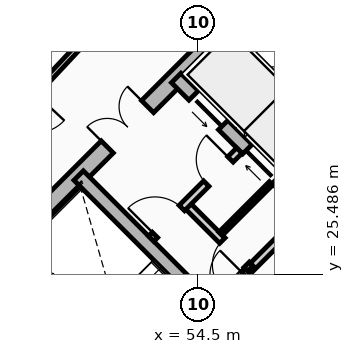
"""IFC4 building model, lengths in metres.
Left out: names, types, materials, properties, quantities, classifications, styles, units other than length and angle.
Written with IfcOpenShell. Run it as: python <this file> out.ifc"""

import sys

from ifc_helpers import new_model, si_unit, direction, frame, frame_2d, origin, place, context, subcontext, project, spatial, rectangle, extrude, source, transform, mapped, element, fill, save


model = new_model("IFC4")
c1 = context("Model", 3, precision=1e-05, world=origin(), true_north=direction((0.0, 1.0)))
c2 = subcontext(c1, "Body", "Model", "MODEL_VIEW")
j1 = project(units=[si_unit("LENGTHUNIT", "METRE"), si_unit("PLANEANGLEUNIT", "RADIAN")], contexts=[c1])
p1 = place(None, origin())
s1 = spatial("IfcSite", under=j1, at=p1, CompositionType="ELEMENT")
p2 = place(p1, origin())
s2 = spatial("IfcBuilding", under=s1, at=p2, CompositionType="ELEMENT")
p3 = place(p2, frame((0.0, 0.0, 73.06)))
s3 = spatial("IfcBuildingStorey", under=s2, at=p3, CompositionType="ELEMENT", Elevation=73.06)
for number, where, z_axis, x_axis in (
    (1, (58.737, 15.697, 0.0), (0.0, 0.0, 1.0), (-0.707, 0.707, 0.0)),
    (2, (66.303, 23.263, 0.0), (0.0, 0.0, 1.0), (-0.707, 0.707, 0.0)),
):
    element("IfcWall", number, at=place(p3, frame(where, z_axis=z_axis, x_axis=x_axis)), inside=s3, PredefinedType="SHEAR", context=c2, shape_type="SweptSolid", body=[
        extrude(rectangle(XDim=14.2, YDim=0.45, at=frame_2d((7.1, 0.0))), origin(), (0.0, 0.0, 1.0), 2.91),
    ])
p4 = place(p3, frame((48.856, 25.578, 0.0), z_axis=(0.0, 0.0, 1.0), x_axis=(0.707106781187, 0.707106781187, 0.0)))
e3 = element("IfcWall", 3, at=p4, inside=s3, PredefinedType="SHEAR", context=c2, shape_type="SweptSolid", body=[
    extrude(rectangle(XDim=10.7, YDim=0.45, at=frame_2d((5.35, 0.0))), origin(), (0.0, 0.0, 1.0), 2.91),
])
m1 = source(origin(), c2, "Body", "SweptSolid", [
    extrude(rectangle(XDim=1.5, YDim=2.02, at=frame_2d((0.75, 1.01))), frame((0.0, 0.235, 0.0), z_axis=(0.0, -1.0, 0.0), x_axis=(1.0, 0.0, 0.0)), (0.0, 0.0, 1.0), 0.47),
])
p5 = place(p4, frame((4.6, 0.0, 0.0)))
e4 = element("IfcOpeningElement", 4, at=p5, cuts=e3, PredefinedType="OPENING", context=c2, shape_type="MappedRepresentation", body=[
    mapped(m1, transform((0.0, 0.0, 0.0), x_axis=(1.0, 0.0, 0.0), y_axis=(0.0, 1.0, 0.0), z_axis=(0.0, 0.0, 1.0), scale=1.0)),
])
p6 = place(p3, frame((61.078, 18.355, 0.0), z_axis=(0.0, 0.0, 1.0), x_axis=(-0.707106781187, 0.707106781187, 0.0)))
e5 = element("IfcWall", 5, at=p6, inside=s3, PredefinedType="SHEAR", context=c2, shape_type="SweptSolid", body=[
    extrude(rectangle(XDim=13.75, YDim=0.35, at=frame_2d((6.875, 0.0))), origin(), (0.0, 0.0, 1.0), 2.91),
])
m2 = source(origin(), c2, "Body", "SweptSolid", [
    extrude(rectangle(XDim=1.1, YDim=2.015, at=frame_2d((0.55, 1.007))), frame((0.0, 0.185, 0.0), z_axis=(0.0, -1.0, 0.0), x_axis=(1.0, 0.0, 0.0)), (0.0, 0.0, 1.0), 0.37),
])
p7 = place(p6, frame((4.875, 0.0, 0.0)))
e6 = element("IfcOpeningElement", 6, at=p7, cuts=e5, PredefinedType="OPENING", context=c2, shape_type="MappedRepresentation", body=[
    mapped(m2, transform((0.0, 0.0, 0.0), x_axis=(1.0, 0.0, 0.0), y_axis=(0.0, 1.0, 0.0), z_axis=(0.0, 0.0, 1.0), scale=1.0)),
])
m3 = source(origin(), c2, "Body", "SweptSolid", [
    extrude(rectangle(XDim=1.15, YDim=2.02, at=frame_2d((0.575, 1.01))), frame((0.0, 0.185, 0.0), z_axis=(0.0, -1.0, 0.0), x_axis=(1.0, 0.0, 0.0)), (0.0, 0.0, 1.0), 0.37),
])
p8 = place(p6, frame((7.295, 0.0, 0.0)))
e7 = element("IfcOpeningElement", 7, at=p8, cuts=e5, PredefinedType="OPENING", context=c2, shape_type="MappedRepresentation", body=[
    mapped(m3, transform((0.0, 0.0, 0.0), x_axis=(1.0, 0.0, 0.0), y_axis=(0.0, 1.0, 0.0), z_axis=(0.0, 0.0, 1.0), scale=1.0)),
])
p9 = place(p3, frame((63.645, 20.922, 0.0), z_axis=(0.0, 0.0, 1.0), x_axis=(-0.707106781187, 0.707106781187, 0.0)))
e8 = element("IfcWall", 8, at=p9, inside=s3, PredefinedType="SHEAR", context=c2, shape_type="SweptSolid", body=[
    extrude(rectangle(XDim=13.75, YDim=0.35, at=frame_2d((6.875, 0.0))), origin(), (0.0, 0.0, 1.0), 2.91),
])
p10 = place(p9, frame((10.0, 0.0, 0.0)))
e9 = element("IfcOpeningElement", 9, at=p10, cuts=e8, PredefinedType="OPENING", context=c2, shape_type="MappedRepresentation", body=[
    mapped(m2, transform((0.0, 0.0, 0.0), x_axis=(1.0, 0.0, 0.0), y_axis=(0.0, 1.0, 0.0), z_axis=(0.0, 0.0, 1.0), scale=1.0)),
])
p11 = place(p9, frame((12.0, 0.0, 0.0)))
e10 = element("IfcOpeningElement", 10, at=p11, cuts=e8, PredefinedType="OPENING", context=c2, shape_type="MappedRepresentation", body=[
    mapped(m2, transform((0.0, 0.0, 0.0), x_axis=(1.0, 0.0, 0.0), y_axis=(0.0, 1.0, 0.0), z_axis=(0.0, 0.0, 1.0), scale=1.0)),
])
p12 = place(p9, frame((5.305, 0.0, 0.0)))
e11 = element("IfcOpeningElement", 11, at=p12, cuts=e8, PredefinedType="OPENING", context=c2, shape_type="MappedRepresentation", body=[
    mapped(m3, transform((0.0, 0.0, 0.0), x_axis=(1.0, 0.0, 0.0), y_axis=(0.0, 1.0, 0.0), z_axis=(0.0, 0.0, 1.0), scale=1.0)),
])
p13 = place(p3, frame((53.922, 21.141, 0.0), z_axis=(0.0, 0.0, 1.0), x_axis=(-0.707088616009, 0.707124945897, 0.0)))
e12 = element("IfcWall", 12, at=p13, inside=s3, PredefinedType="SHEAR", context=c2, shape_type="SweptSolid", body=[
    extrude(rectangle(XDim=6.72, YDim=0.35, at=frame_2d((3.36, 0.0))), origin(), (0.0, 0.0, 1.0), 2.91),
])
p14 = place(p3, frame((55.615, 29.227, 0.0), z_axis=(0.0, 0.0, 1.0), x_axis=(0.707147878904, 0.70706568108, 0.0)))
e13 = element("IfcWall", 13, at=p14, inside=s3, PredefinedType="SHEAR", context=c2, shape_type="SweptSolid", body=[
    extrude(rectangle(XDim=2.97, YDim=0.2, at=frame_2d((1.485, 0.0))), origin(), (0.0, 0.0, 1.0), 2.91),
])
p15 = place(p3, frame((57.419, 31.2, 0.0), z_axis=(0.0, 0.0, 1.0), x_axis=(-0.707032117043, 0.707181437447, 0.0)))
e14 = element("IfcWall", 14, at=p15, inside=s3, PredefinedType="SHEAR", context=c2, shape_type="SweptSolid", body=[
    extrude(rectangle(XDim=1.635, YDim=0.2, at=frame_2d((0.817, 0.0))), origin(), (0.0, 0.0, 1.0), 2.91),
])
p16 = place(p3, frame((54.961, 24.719, 0.0), z_axis=(0.0, 0.0, 1.0), x_axis=(0.707106781187, 0.707106781187, 0.0)))
e15 = element("IfcWall", 15, at=p16, inside=s3, PredefinedType="PARTITIONING", context=c2, shape_type="SweptSolid", body=[
    extrude(rectangle(XDim=3.28, YDim=0.2, at=frame_2d((1.64, 0.0))), origin(), (0.0, 0.0, 1.0), 2.655),
])
m4 = source(origin(), c2, "Body", "SweptSolid", [
    extrude(rectangle(XDim=0.9, YDim=2.005, at=frame_2d((0.45, 1.002))), frame((0.0, 0.11, 0.0), z_axis=(0.0, -1.0, 0.0), x_axis=(1.0, 0.0, 0.0)), (0.0, 0.0, 1.0), 0.22),
])
p17 = place(p16, frame((0.16, 0.0, 0.0)))
e16 = element("IfcOpeningElement", 16, at=p17, cuts=e15, PredefinedType="OPENING", context=c2, shape_type="MappedRepresentation", body=[
    mapped(m4, transform((0.0, 0.0, 0.0), x_axis=(1.0, 0.0, 0.0), y_axis=(0.0, 1.0, 0.0), z_axis=(0.0, 0.0, 1.0), scale=1.0)),
])
p18 = place(p3, frame((55.874, 25.631, 0.0), z_axis=(0.0, 0.0, 1.0), x_axis=(-0.707157639372, 0.707055919343, 0.0)))
e17 = element("IfcWall", 17, at=p18, inside=s3, PredefinedType="PARTITIONING", context=c2, shape_type="SweptSolid", body=[
    extrude(rectangle(XDim=2.4, YDim=0.2, at=frame_2d((1.2, 0.0))), origin(), (0.0, 0.0, 1.0), 2.655),
])
p19 = place(p18, frame((0.14, 0.0, 0.0)))
e18 = element("IfcOpeningElement", 18, at=p19, cuts=e17, PredefinedType="OPENING", context=c2, shape_type="MappedRepresentation", body=[
    mapped(m4, transform((0.0, 0.0, 0.0), x_axis=(1.0, 0.0, 0.0), y_axis=(0.0, 1.0, 0.0), z_axis=(0.0, 0.0, 1.0), scale=1.0)),
])
p20 = place(p3, frame((53.264, 26.416, 0.0), z_axis=(0.0, 0.0, 1.0), x_axis=(0.707106781187, 0.707106781187, 0.0)))
e19 = element("IfcWall", 19, at=p20, inside=s3, PredefinedType="PARTITIONING", context=c2, shape_type="SweptSolid", body=[
    extrude(rectangle(XDim=3.28, YDim=0.2, at=frame_2d((1.64, 0.0))), origin(), (0.0, 0.0, 1.0), 2.655),
])
m5 = source(origin(), c2, "Body", "SweptSolid", [
    extrude(rectangle(XDim=1.0, YDim=2.015, at=frame_2d((0.5, 1.007))), frame((0.0, 0.11, 0.0), z_axis=(0.0, -1.0, 0.0), x_axis=(1.0, 0.0, 0.0)), (0.0, 0.0, 1.0), 0.22),
])
p21 = place(p20, frame((0.14, 0.0, 0.0)))
e20 = element("IfcOpeningElement", 20, at=p21, cuts=e19, PredefinedType="OPENING", context=c2, shape_type="MappedRepresentation", body=[
    mapped(m5, transform((0.0, 0.0, 0.0), x_axis=(1.0, 0.0, 0.0), y_axis=(0.0, 1.0, 0.0), z_axis=(0.0, 0.0, 1.0), scale=1.0)),
])
p22 = place(p20, frame((2.05, 0.0, 0.0)))
e21 = element("IfcOpeningElement", 21, at=p22, cuts=e19, PredefinedType="OPENING", context=c2, shape_type="MappedRepresentation", body=[
    mapped(m4, transform((0.0, 0.0, 0.0), x_axis=(1.0, 0.0, 0.0), y_axis=(0.0, 1.0, 0.0), z_axis=(0.0, 0.0, 1.0), scale=1.0)),
])
p23 = place(p3, frame((55.089, 26.543, 0.0), z_axis=(0.0, 0.0, 1.0), x_axis=(0.707106781187, 0.707106781187, 0.0)))
e22 = element("IfcWall", 22, at=p23, inside=s3, PredefinedType="PARTITIONING", context=c2, shape_type="SweptSolid", body=[
    extrude(rectangle(XDim=1.88, YDim=0.125, at=frame_2d((0.94, 0.0))), origin(), (0.0, 0.0, 1.0), 2.655),
])
p24 = place(p3, frame((52.079, 32.244, 0.0), z_axis=(0.0, 0.0, 1.0), x_axis=(-0.682703325574, -0.730695674854, 0.0)))
e23 = element("IfcWall", 23, at=p24, inside=s3, PredefinedType="PARTITIONING", context=c2, shape_type="SweptSolid", body=[
    extrude(rectangle(XDim=6.527, YDim=0.15, at=frame_2d((3.263, 0.0))), origin(), (0.0, 0.0, 1.0), 2.225),
])
m6 = source(origin(), c2, "Body", "SweptSolid", [
    extrude(rectangle(XDim=1.05, YDim=2.015, at=frame_2d((0.525, 1.007))), frame((0.0, 0.085, 0.0), z_axis=(0.0, -1.0, 0.0), x_axis=(1.0, 0.0, 0.0)), (0.0, 0.0, 1.0), 0.17),
])
p25 = place(p24, frame((2.738, 0.0, 0.0)))
e24 = element("IfcOpeningElement", 24, at=p25, cuts=e23, PredefinedType="OPENING", context=c2, shape_type="MappedRepresentation", body=[
    mapped(m6, transform((0.0, 0.0, 0.0), x_axis=(1.0, 0.0, 0.0), y_axis=(0.0, 1.0, 0.0), z_axis=(0.0, 0.0, 1.0), scale=1.0)),
])
m7 = source(origin(), c2, "Body", "SweptSolid", [
    extrude(rectangle(XDim=1.1, YDim=2.015, at=frame_2d((0.55, 1.007))), frame((0.0, 0.025, 0.0), z_axis=(0.0, -1.0, 0.0), x_axis=(1.0, 0.0, 0.0)), (0.0, 0.0, 1.0), 0.05),
])
p26 = place(p10, origin())
e25 = element("IfcDoor", 25, at=p26, inside=s3, OperationType="SLIDING_TO_RIGHT", PredefinedType="DOOR", context=c2, shape_type="MappedRepresentation", body=[
    mapped(m7, transform((0.0, 0.0, 0.0), x_axis=(1.0, 0.0, 0.0), y_axis=(0.0, 1.0, 0.0), z_axis=(0.0, 0.0, 1.0), scale=1.0)),
])
fill(e9, e25)
p27 = place(p11, origin())
e26 = element("IfcDoor", 26, at=p27, inside=s3, OperationType="SLIDING_TO_LEFT", PredefinedType="DOOR", context=c2, shape_type="MappedRepresentation", body=[
    mapped(m7, transform((0.0, 0.0, 0.0), x_axis=(1.0, 0.0, 0.0), y_axis=(0.0, 1.0, 0.0), z_axis=(0.0, 0.0, 1.0), scale=1.0)),
])
fill(e10, e26)
m8 = source(origin(), c2, "Body", "SweptSolid", [
    extrude(rectangle(XDim=1.5, YDim=2.02, at=frame_2d((0.75, 1.01))), frame((0.0, 0.025, 0.0), z_axis=(0.0, -1.0, 0.0), x_axis=(1.0, 0.0, 0.0)), (0.0, 0.0, 1.0), 0.05),
])
p28 = place(p5, origin())
e27 = element("IfcDoor", 27, at=p28, inside=s3, OperationType="DOUBLE_DOOR_SINGLE_SWING", PredefinedType="DOOR", context=c2, shape_type="MappedRepresentation", body=[
    mapped(m8, transform((0.0, 0.0, 0.0), x_axis=(1.0, 0.0, 0.0), y_axis=(0.0, 1.0, 0.0), z_axis=(0.0, 0.0, 1.0), scale=1.0)),
])
fill(e4, e27)
m9 = source(origin(), c2, "Body", "SweptSolid", [
    extrude(rectangle(XDim=0.9, YDim=2.005, at=frame_2d((0.45, 1.002))), frame((0.0, 0.025, 0.0), z_axis=(0.0, -1.0, 0.0), x_axis=(1.0, 0.0, 0.0)), (0.0, 0.0, 1.0), 0.05),
])
p29 = place(p17, origin())
e28 = element("IfcDoor", 28, at=p29, inside=s3, OperationType="SINGLE_SWING_RIGHT", PredefinedType="DOOR", context=c2, shape_type="MappedRepresentation", body=[
    mapped(m9, transform((0.0, 0.0, 0.0), x_axis=(1.0, 0.0, 0.0), y_axis=(0.0, 1.0, 0.0), z_axis=(0.0, 0.0, 1.0), scale=1.0)),
])
fill(e16, e28)
m10 = source(origin(), c2, "Body", "SweptSolid", [
    extrude(rectangle(XDim=1.0, YDim=2.015, at=frame_2d((0.5, 1.007))), frame((0.0, 0.025, 0.0), z_axis=(0.0, -1.0, 0.0), x_axis=(1.0, 0.0, 0.0)), (0.0, 0.0, 1.0), 0.05),
])
p30 = place(p21, origin())
e29 = element("IfcDoor", 29, at=p30, inside=s3, OperationType="SINGLE_SWING_LEFT", PredefinedType="DOOR", context=c2, shape_type="MappedRepresentation", body=[
    mapped(m10, transform((0.0, 0.0, 0.0), x_axis=(1.0, 0.0, 0.0), y_axis=(0.0, 1.0, 0.0), z_axis=(0.0, 0.0, 1.0), scale=1.0)),
])
fill(e20, e29)
p31 = place(p19, origin())
e30 = element("IfcDoor", 30, at=p31, inside=s3, OperationType="SINGLE_SWING_LEFT", PredefinedType="DOOR", context=c2, shape_type="MappedRepresentation", body=[
    mapped(m9, transform((0.0, 0.0, 0.0), x_axis=(1.0, 0.0, 0.0), y_axis=(0.0, 1.0, 0.0), z_axis=(0.0, 0.0, 1.0), scale=1.0)),
])
fill(e18, e30)
p32 = place(p22, origin())
e31 = element("IfcDoor", 31, at=p32, inside=s3, OperationType="SINGLE_SWING_RIGHT", PredefinedType="DOOR", context=c2, shape_type="MappedRepresentation", body=[
    mapped(m9, transform((0.0, 0.0, 0.0), x_axis=(1.0, 0.0, 0.0), y_axis=(0.0, 1.0, 0.0), z_axis=(0.0, 0.0, 1.0), scale=1.0)),
])
fill(e21, e31)
save(model, sys.argv[1])
